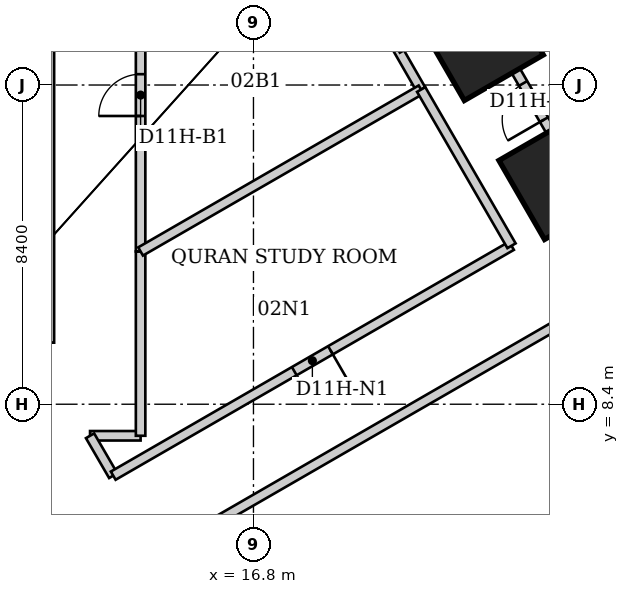
"""IFC4 building model, lengths in metres.
Left out: names, types, materials, properties, quantities, classifications, styles, units other than length and angle.
Written with IfcOpenShell. Run it as: python <this file> out.ifc"""

import sys

from ifc_helpers import new_model, si_unit, direction, frame, frame_2d, origin, origin_2d, place, context, subcontext, project, spatial, rectangle, extrude, element, fill, save


model = new_model("IFC4")
c1 = context("Model", 3, precision=1e-05, world=origin(), true_north=direction((0.0, 1.0)))
c2 = subcontext(c1, "Body", "Model", "MODEL_VIEW")
j1 = project(units=[si_unit("LENGTHUNIT", "METRE"), si_unit("PLANEANGLEUNIT", "RADIAN")], contexts=[c1])
p1 = place(None, origin())
s1 = spatial("IfcSite", under=j1, at=p1, CompositionType="ELEMENT")
p2 = place(p1, origin())
s2 = spatial("IfcBuilding", under=s1, at=p2, CompositionType="ELEMENT")
p3 = place(p2, frame((0.0, 0.0, 12.0)))
s3 = spatial("IfcBuildingStorey", under=s2, at=p3, CompositionType="ELEMENT", Elevation=12.0)
for number, where, z_axis, x_axis in (
    (1, (22.788, 18.032, 0.0), (0.0, 0.0, 1.0), (0.866, 0.5, 0.0)),
    (2, (24.899, 14.375, 0.0), (0.0, 0.0, 1.0), (0.866, 0.5, 0.0)),
):
    element("IfcColumn", number, at=place(p3, frame(where, z_axis=z_axis, x_axis=x_axis)), inside=s3, PredefinedType="COLUMN", context=c2, shape_type="SweptSolid", body=[
        extrude(rectangle(XDim=2.4, YDim=2.4, at=origin_2d()), origin(), (0.0, 0.0, 1.0), 6.0),
    ])
p4 = place(p3, frame((15.455, -40.895, 0.0), z_axis=(0.0, 0.0, 1.0), x_axis=(0.500000660882, 0.866025022224, 0.0)))
e3 = element("IfcWall", 3, at=p4, inside=s3, PredefinedType="PARAPET", context=c2, shape_type="SweptSolid", body=[
    extrude(rectangle(XDim=55.377, YDim=0.25, at=frame_2d((27.688, 0.0))), origin(), (0.0, 0.0, 1.0), 1.1),
])
p5 = place(p3, frame((11.43, 20.65, 0.0), z_axis=(0.0, 0.0, 1.0), x_axis=(0.0, -1.0, 0.0)))
e4 = element("IfcWall", 4, at=p5, inside=s3, PredefinedType="PARTITIONING", context=c2, shape_type="SweptSolid", body=[
    extrude(rectangle(XDim=10.63, YDim=0.25, at=frame_2d((5.315, 0.0))), origin(), (0.0, 0.0, 1.0), 5.84),
])
p6 = place(p3, frame((12.23, 3.24, 0.0), z_axis=(0.0, 0.0, 1.0), x_axis=(0.866071776036, 0.499919672301, 0.0)))
e5 = element("IfcWall", 5, at=p6, inside=s3, PredefinedType="PARTITIONING", context=c2, shape_type="SweptSolid", body=[
    extrude(rectangle(XDim=14.502, YDim=0.25, at=frame_2d((7.251, 0.0))), origin(), (0.0, 0.0, 1.0), 5.84),
])
p7 = place(p3, frame((12.5, 7.57, 0.0), z_axis=(0.0, 0.0, 1.0), x_axis=(1.0, 0.0, 0.0)))
e6 = element("IfcWall", 6, at=p7, inside=s3, PredefinedType="PARTITIONING", context=c2, shape_type="SweptSolid", body=[
    extrude(rectangle(XDim=1.33, YDim=0.25, at=frame_2d((0.665, 0.0))), origin(), (0.0, 0.0, 1.0), 5.84),
])
p8 = place(p3, frame((13.11, 6.52, 0.0), z_axis=(0.0, 0.0, 1.0), x_axis=(-0.502382838514, 0.864645293497, 0.0)))
e7 = element("IfcWall", 7, at=p8, inside=s3, PredefinedType="PARTITIONING", context=c2, shape_type="SweptSolid", body=[
    extrude(rectangle(XDim=1.214, YDim=0.25, at=frame_2d((0.607, 0.0))), origin(), (0.0, 0.0, 1.0), 5.84),
])
p9 = place(p3, frame((13.83, 7.57, 0.0), z_axis=(0.0, 0.0, 1.0), x_axis=(0.0, 1.0, 0.0)))
e8 = element("IfcWall", 8, at=p9, inside=s3, PredefinedType="PARTITIONING", context=c2, shape_type="SweptSolid", body=[
    extrude(rectangle(XDim=4.85, YDim=0.25, at=frame_2d((2.425, 0.0))), origin(), (0.0, 0.0, 1.0), 5.84),
])
p10 = place(p3, frame((13.83, 12.42, 0.0), z_axis=(0.0, 0.0, 1.0), x_axis=(0.0, 1.0, 0.0)))
e9 = element("IfcWall", 9, at=p10, inside=s3, PredefinedType="PARTITIONING", context=c2, shape_type="SweptSolid", body=[
    extrude(rectangle(XDim=8.23, YDim=0.25, at=frame_2d((4.115, 0.0))), origin(), (0.0, 0.0, 1.0), 5.84),
])
p11 = place(p10, frame((3.565, 0.0, 0.0)))
e10 = element("IfcOpeningElement", 10, at=p11, cuts=e9, PredefinedType="OPENING", context=c2, shape_type="SweptSolid", body=[
    extrude(rectangle(XDim=1.1, YDim=2.2, at=frame_2d((0.55, 1.1))), frame((0.0, 0.125, 0.0), z_axis=(0.0, -1.0, 0.0), x_axis=(1.0, 0.0, 0.0)), (0.0, 0.0, 1.0), 0.25),
])
p12 = place(p3, frame((20.59, 17.76, 0.0), z_axis=(0.0, 0.0, 1.0), x_axis=(0.497763752085, -0.867312658221, 0.0)))
e11 = element("IfcWall", 11, at=p12, inside=s3, PredefinedType="PARTITIONING", context=c2, shape_type="SweptSolid", body=[
    extrude(rectangle(XDim=1.245, YDim=0.25, at=frame_2d((0.623, 0.0))), origin(), (0.0, 0.0, 1.0), 5.84),
])
p13 = place(p3, frame((21.21, 16.68, 0.0), z_axis=(0.0, 0.0, 1.0), x_axis=(-0.866064405698, -0.499932440619, 0.0)))
e12 = element("IfcWall", 12, at=p13, inside=s3, PredefinedType="PARTITIONING", context=c2, shape_type="SweptSolid", body=[
    extrude(rectangle(XDim=8.521, YDim=0.25, at=frame_2d((4.261, 0.0))), origin(), (0.0, 0.0, 1.0), 5.84),
])
p14 = place(p3, frame((22.67, 18.96, 0.0), z_axis=(0.0, 0.0, 1.0), x_axis=(-0.866177122335, -0.499737123639, 0.0)))
e13 = element("IfcWall", 13, at=p14, inside=s3, PredefinedType="PARTITIONING", context=c2, shape_type="SweptSolid", body=[
    extrude(rectangle(XDim=2.401, YDim=0.25, at=frame_2d((1.201, 0.0))), origin(), (0.0, 0.0, 1.0), 5.84),
])
p15 = place(p3, frame((23.59, 12.57, 0.0), z_axis=(0.0, 0.0, 1.0), x_axis=(-0.866045825216, -0.499964627375, 0.0)))
e14 = element("IfcWall", 14, at=p15, inside=s3, PredefinedType="PARTITIONING", context=c2, shape_type="SweptSolid", body=[
    extrude(rectangle(XDim=12.101, YDim=0.25, at=frame_2d((6.051, 0.0))), origin(), (0.0, 0.0, 1.0), 5.84),
])
p16 = place(p15, frame((5.5, 0.0, 0.0)))
e15 = element("IfcOpeningElement", 15, at=p16, cuts=e14, PredefinedType="OPENING", context=c2, shape_type="SweptSolid", body=[
    extrude(rectangle(XDim=1.1, YDim=2.2, at=frame_2d((0.55, 1.1))), frame((0.0, 0.125, 0.0), z_axis=(0.0, -1.0, 0.0), x_axis=(1.0, 0.0, 0.0)), (0.0, 0.0, 1.0), 0.25),
])
p17 = place(p3, frame((23.59, 12.57, 0.0), z_axis=(0.0, 0.0, 1.0), x_axis=(-0.500472849402, 0.865752231884, 0.0)))
e16 = element("IfcWall", 16, at=p17, inside=s3, PredefinedType="PARTITIONING", context=c2, shape_type="SweptSolid", body=[
    extrude(rectangle(XDim=4.75, YDim=0.25, at=frame_2d((2.375, 0.0))), origin(), (0.0, 0.0, 1.0), 5.84),
])
p18 = place(p3, frame((25.67, 13.77, 0.0), z_axis=(0.0, 0.0, 1.0), x_axis=(-0.50044857655, 0.865766263046, 0.0)))
e17 = element("IfcWall", 17, at=p18, inside=s3, PredefinedType="PARTITIONING", context=c2, shape_type="SweptSolid", body=[
    extrude(rectangle(XDim=5.995, YDim=0.25, at=frame_2d((2.997, 0.0))), origin(), (0.0, 0.0, 1.0), 4.04),
])
p19 = place(p18, frame((2.448, 0.0, 0.0)))
e18 = element("IfcOpeningElement", 18, at=p19, cuts=e17, PredefinedType="OPENING", context=c2, shape_type="SweptSolid", body=[
    extrude(rectangle(XDim=1.1, YDim=2.2, at=frame_2d((0.55, 1.1))), frame((0.0, 0.125, 0.0), z_axis=(0.0, -1.0, 0.0), x_axis=(1.0, 0.0, 0.0)), (0.0, 0.0, 1.0), 0.25),
])
p20 = place(p3, frame((28.815, 12.813, 0.0), z_axis=(0.0, 0.0, 1.0), x_axis=(-0.500015592816, 0.866016401081, 0.0)))
e19 = element("IfcWall", 19, at=p20, inside=s3, PredefinedType="SHEAR", context=c2, shape_type="SweptSolid", body=[
    extrude(rectangle(XDim=9.3, YDim=0.3, at=frame_2d((4.65, 0.0))), origin(), (0.0, 0.0, 1.0), 6.0),
])
p21 = place(p20, frame((0.3, 0.0, 0.0)))
e20 = element("IfcOpeningElement", 20, at=p21, cuts=e19, PredefinedType="OPENING", context=c2, shape_type="SweptSolid", body=[
    extrude(rectangle(XDim=1.8, YDim=2.4, at=frame_2d((0.9, 1.2))), frame((0.0, 0.15, 0.0), z_axis=(0.0, -1.0, 0.0), x_axis=(1.0, 0.0, 0.0)), (0.0, 0.0, 1.0), 0.3),
])
p22 = place(p19, origin())
e21 = element("IfcDoor", 21, at=p22, inside=s3, OperationType="SINGLE_SWING_LEFT", PredefinedType="DOOR", context=c2, shape_type="SweptSolid", body=[
    extrude(rectangle(XDim=1.1, YDim=2.2, at=frame_2d((0.55, 1.1))), frame((0.0, 0.025, 0.0), z_axis=(0.0, -1.0, 0.0), x_axis=(1.0, 0.0, 0.0)), (0.0, 0.0, 1.0), 0.05),
])
fill(e18, e21)
p23 = place(p11, origin())
e22 = element("IfcDoor", 22, at=p23, inside=s3, OperationType="SINGLE_SWING_LEFT", PredefinedType="DOOR", context=c2, shape_type="SweptSolid", body=[
    extrude(rectangle(XDim=1.1, YDim=2.2, at=frame_2d((0.55, 1.1))), frame((0.0, 0.025, 0.0), z_axis=(0.0, -1.0, 0.0), x_axis=(1.0, 0.0, 0.0)), (0.0, 0.0, 1.0), 0.05),
])
fill(e10, e22)
p24 = place(p16, origin())
e23 = element("IfcDoor", 23, at=p24, inside=s3, OperationType="SINGLE_SWING_LEFT", PredefinedType="DOOR", context=c2, shape_type="SweptSolid", body=[
    extrude(rectangle(XDim=1.1, YDim=2.2, at=frame_2d((0.55, 1.1))), frame((0.0, 0.025, 0.0), z_axis=(0.0, -1.0, 0.0), x_axis=(1.0, 0.0, 0.0)), (0.0, 0.0, 1.0), 0.05),
])
fill(e15, e23)
save(model, sys.argv[1])
